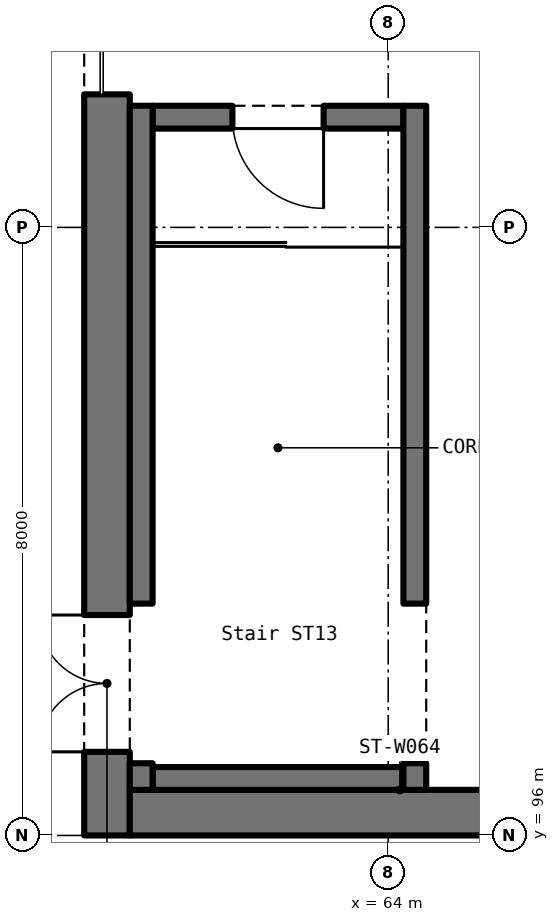
"""IFC4 building model, lengths in metres.
Left out: names, types, materials, properties, quantities, classifications, styles, units other than length and angle.
Written with IfcOpenShell. Run it as: python <this file> out.ifc"""

import sys

from ifc_helpers import new_model, si_unit, direction, frame, frame_2d, origin, place, context, subcontext, project, spatial, rectangle, extrude, element, fill, save


model = new_model("IFC4")
c1 = context("Model", 3, precision=1e-05, world=origin(), true_north=direction((0.0, 1.0)))
c2 = subcontext(c1, "Body", "Model", "MODEL_VIEW")
j1 = project(units=[si_unit("LENGTHUNIT", "METRE"), si_unit("PLANEANGLEUNIT", "RADIAN")], contexts=[c1])
p1 = place(None, origin())
s1 = spatial("IfcSite", under=j1, at=p1, CompositionType="ELEMENT")
p2 = place(p1, origin())
s2 = spatial("IfcBuilding", under=s1, at=p2, CompositionType="ELEMENT")
p3 = place(p2, origin())
s3 = spatial("IfcBuildingStorey", under=s2, at=p3, CompositionType="ELEMENT", Elevation=0.0)
p4 = place(p3, frame((60.3, 96.0, 0.0), z_axis=(0.0, 0.0, 1.0), x_axis=(0.0, 1.0, 0.0)))
e1 = element("IfcWall", 1, at=p4, inside=s3, PredefinedType="SHEAR", context=c2, shape_type="SweptSolid", body=[
    extrude(rectangle(XDim=24.3, YDim=0.6, at=frame_2d((12.15, 0.0))), origin(), (0.0, 0.0, 1.0), 6.0),
])
p5 = place(p4, frame((9.75, 0.0, 0.0)))
e2 = element("IfcOpeningElement", 2, at=p5, cuts=e1, PredefinedType="OPENING", context=c2, shape_type="SweptSolid", body=[
    extrude(rectangle(XDim=4.8, YDim=4.8, at=frame_2d((2.4, 2.4))), frame((0.0, 0.312, 0.0), z_axis=(0.0, -1.0, 0.0), x_axis=(1.0, 0.0, 0.0)), (0.0, 0.0, 1.0), 0.624),
])
p6 = place(p4, frame((15.2, 0.0, 0.0)))
e3 = element("IfcOpeningElement", 3, at=p6, cuts=e1, PredefinedType="OPENING", context=c2, shape_type="SweptSolid", body=[
    extrude(rectangle(XDim=1.8, YDim=2.4, at=frame_2d((0.9, 1.2))), frame((0.0, 0.312, 0.0), z_axis=(0.0, -1.0, 0.0), x_axis=(1.0, 0.0, 0.0)), (0.0, 0.0, 1.0), 0.624),
])
p7 = place(p4, frame((1.1, 0.0, 0.0)))
e4 = element("IfcOpeningElement", 4, at=p7, cuts=e1, PredefinedType="OPENING", context=c2, shape_type="SweptSolid", body=[
    extrude(rectangle(XDim=1.8, YDim=2.4, at=frame_2d((0.9, 1.2))), frame((0.0, 0.312, 0.0), z_axis=(0.0, -1.0, 0.0), x_axis=(1.0, 0.0, 0.0)), (0.0, 0.0, 1.0), 0.624),
])
p8 = place(p3, frame((60.6, 96.3, 0.0), z_axis=(0.0, 0.0, 1.0), x_axis=(1.0, 0.0, 0.0)))
e5 = element("IfcWall", 5, at=p8, inside=s3, PredefinedType="SHEAR", context=c2, shape_type="SweptSolid", body=[
    extrude(rectangle(XDim=15.39, YDim=0.6, at=frame_2d((7.695, 0.0))), origin(), (0.0, 0.0, 1.0), 6.0),
])
p9 = place(p3, frame((64.2, 105.45, 0.0), z_axis=(0.0, 0.0, 1.0), x_axis=(-1.0, 0.0, 0.0)))
e6 = element("IfcWall", 6, at=p9, inside=s3, PredefinedType="SOLIDWALL", context=c2, shape_type="SweptSolid", body=[
    extrude(rectangle(XDim=3.3, YDim=0.3, at=frame_2d((1.65, 0.0))), origin(), (0.0, 0.0, 1.0), 5.75),
])
p10 = place(p9, frame((1.05, 0.0, 0.0)))
e7 = element("IfcOpeningElement", 7, at=p10, cuts=e6, PredefinedType="OPENING", context=c2, shape_type="SweptSolid", body=[
    extrude(rectangle(XDim=1.2, YDim=2.1, at=frame_2d((0.6, 1.05))), frame((0.0, 0.162, 0.0), z_axis=(0.0, -1.0, 0.0), x_axis=(1.0, 0.0, 0.0)), (0.0, 0.0, 1.0), 0.324),
])
p11 = place(p3, frame((60.9, 96.75, 0.0), z_axis=(0.0, 0.0, 1.0), x_axis=(1.0, 0.0, 0.0)))
e8 = element("IfcWall", 8, at=p11, inside=s3, PredefinedType="SOLIDWALL", context=c2, shape_type="SweptSolid", body=[
    extrude(rectangle(XDim=3.3, YDim=0.3, at=frame_2d((1.65, 0.0))), origin(), (0.0, 0.0, 1.0), 5.75),
])
p12 = place(p3, frame((64.35, 96.6, 0.0), z_axis=(0.0, 0.0, 1.0), x_axis=(0.0, 1.0, 0.0)))
e9 = element("IfcWall", 9, at=p12, inside=s3, PredefinedType="SOLIDWALL", context=c2, shape_type="SweptSolid", body=[
    extrude(rectangle(XDim=0.35, YDim=0.3, at=frame_2d((0.175, 0.0))), origin(), (0.0, 0.0, 1.0), 5.75),
])
for number, where, z_axis, x_axis in (
    (10, (64.35, 99.05, 0.0), (0.0, 0.0, 1.0), (0.0, 1.0, 0.0)),
    (11, (60.75, 105.6, 0.0), (0.0, 0.0, 1.0), (0.0, -1.0, 0.0)),
):
    element("IfcWall", number, at=place(p3, frame(where, z_axis=z_axis, x_axis=x_axis)), inside=s3, PredefinedType="SOLIDWALL", context=c2, shape_type="SweptSolid", body=[
        extrude(rectangle(XDim=6.55, YDim=0.3, at=frame_2d((3.275, 0.0))), origin(), (0.0, 0.0, 1.0), 5.75),
    ])
p13 = place(p3, frame((60.75, 96.95, 0.0), z_axis=(0.0, 0.0, 1.0), x_axis=(0.0, -1.0, 0.0)))
e12 = element("IfcWall", 12, at=p13, inside=s3, PredefinedType="SOLIDWALL", context=c2, shape_type="SweptSolid", body=[
    extrude(rectangle(XDim=0.35, YDim=0.3, at=frame_2d((0.175, 0.0))), origin(), (0.0, 0.0, 1.0), 5.75),
])
p14 = place(p5, origin())
e13 = element("IfcDoor", 13, at=p14, inside=s3, OperationType="SLIDING_TO_LEFT", PredefinedType="DOOR", context=c2, shape_type="SweptSolid", body=[
    extrude(rectangle(XDim=4.8, YDim=4.8, at=frame_2d((2.4, 2.4))), frame((0.0, 0.025, 0.0), z_axis=(0.0, -1.0, 0.0), x_axis=(1.0, 0.0, 0.0)), (0.0, 0.0, 1.0), 0.05),
])
fill(e2, e13)
p15 = place(p10, origin())
e14 = element("IfcDoor", 14, at=p15, inside=s3, OperationType="SINGLE_SWING_LEFT", PredefinedType="DOOR", context=c2, shape_type="SweptSolid", body=[
    extrude(rectangle(XDim=1.2, YDim=2.1, at=frame_2d((0.6, 1.05))), frame((0.0, 0.025, 0.0), z_axis=(0.0, -1.0, 0.0), x_axis=(1.0, 0.0, 0.0)), (0.0, 0.0, 1.0), 0.05),
])
fill(e7, e14)
p16 = place(p7, origin())
e15 = element("IfcDoor", 15, at=p16, inside=s3, OperationType="DOUBLE_DOOR_DOUBLE_SWING", PredefinedType="DOOR", context=c2, shape_type="SweptSolid", body=[
    extrude(rectangle(XDim=1.8, YDim=2.4, at=frame_2d((0.9, 1.2))), frame((0.0, 0.025, 0.0), z_axis=(0.0, -1.0, 0.0), x_axis=(1.0, 0.0, 0.0)), (0.0, 0.0, 1.0), 0.05),
])
fill(e4, e15)
save(model, sys.argv[1])
